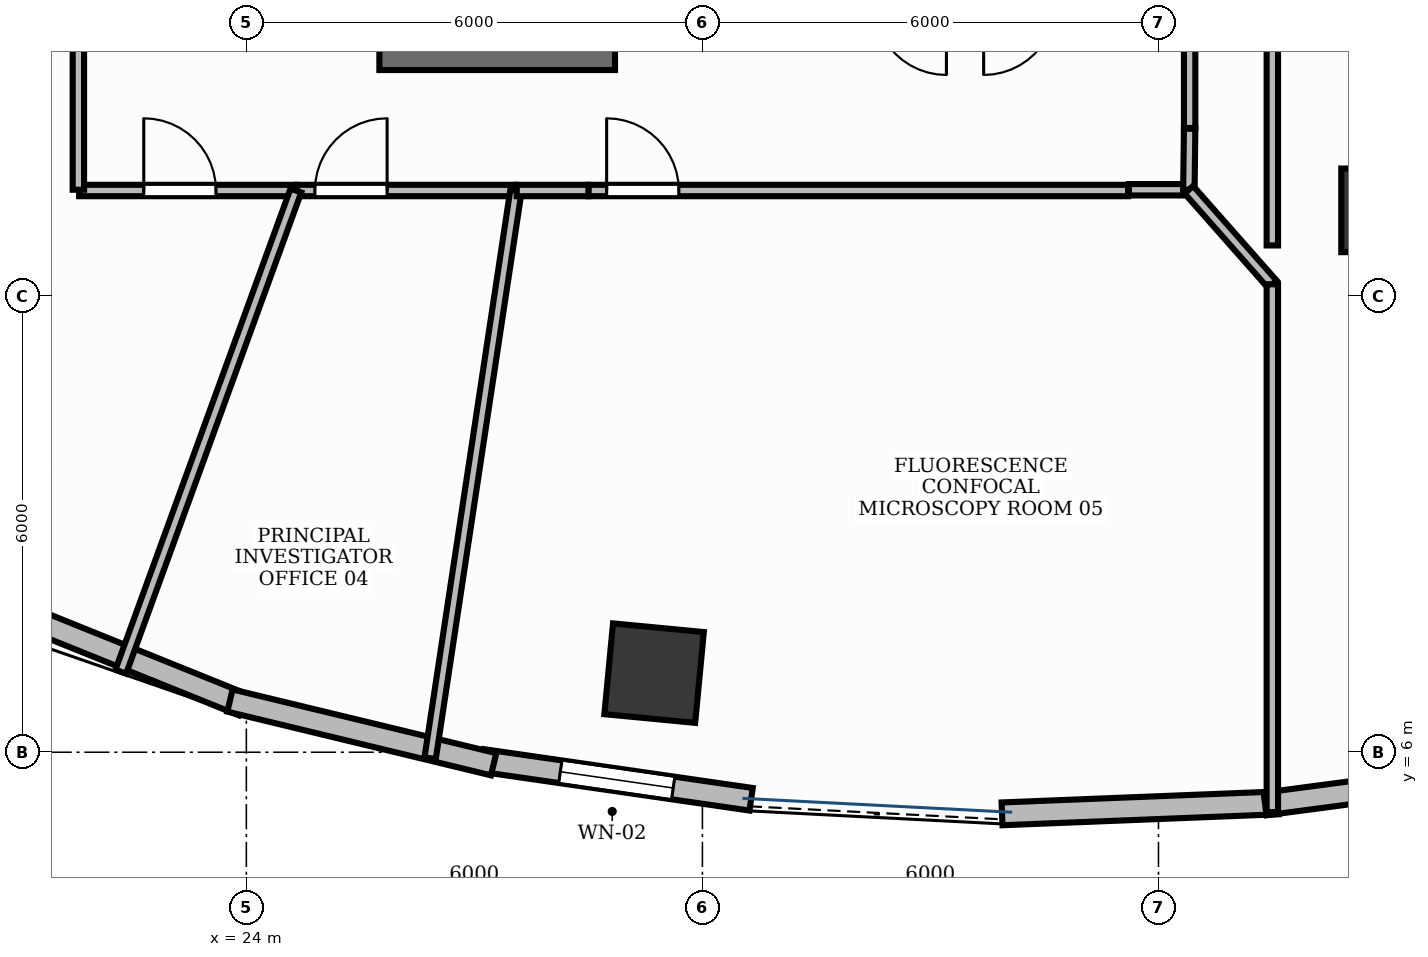
"""IFC4 building model, lengths in metres.
Left out: names, types, materials, properties, quantities, classifications, styles, units other than length and angle.
Written with IfcOpenShell. Run it as: python <this file> out.ifc"""

import sys

from ifc_helpers import new_model, si_unit, direction, frame, frame_2d, origin, origin_2d, place, context, subcontext, project, spatial, rectangle, extrude, element, fill, save


model = new_model("IFC4")
c1 = context("Model", 3, precision=1e-05, world=origin(), true_north=direction((0.0, 1.0)))
c2 = subcontext(c1, "Body", "Model", "MODEL_VIEW")
j1 = project(units=[si_unit("LENGTHUNIT", "METRE"), si_unit("PLANEANGLEUNIT", "RADIAN")], contexts=[c1])
p1 = place(None, origin())
s1 = spatial("IfcSite", under=j1, at=p1, CompositionType="ELEMENT")
p2 = place(p1, origin())
s2 = spatial("IfcBuilding", under=s1, at=p2, CompositionType="ELEMENT")
p3 = place(p2, frame((0.0, 0.0, 115.2)))
s3 = spatial("IfcBuildingStorey", under=s2, at=p3, CompositionType="ELEMENT", Elevation=115.2)
p4 = place(p3, frame((25.75, 15.2, 0.0), z_axis=(0.0, 0.0, 1.0), x_axis=(1.0, 0.0, 0.0)))
e1 = element("IfcWall", 1, at=p4, inside=s3, PredefinedType="SHEAR", context=c2, shape_type="SweptSolid", body=[
    extrude(rectangle(XDim=3.1, YDim=0.45, at=frame_2d((1.55, 0.0))), origin(), (0.0, 0.0, 1.0), 3.9),
])
p5 = place(p3, frame((29.364, 7.041, -0.0), z_axis=(0.0, 0.0, 1.0), x_axis=(-0.995462868748, 0.095150811579, 0.0)))
e2 = element("IfcColumn", 2, at=p5, inside=s3, PredefinedType="COLUMN", context=c2, shape_type="SweptSolid", body=[
    extrude(rectangle(XDim=1.2, YDim=1.2, at=origin_2d()), origin(), (0.0, 0.0, 1.0), 3.901),
])
p6 = place(p3, frame((38.955, 13.129, -0.0), z_axis=(0.0, 0.0, 1.0), x_axis=(1.0, 0.0, 0.0)))
e3 = element("IfcColumn", 3, at=p6, inside=s3, PredefinedType="COLUMN", context=c2, shape_type="SweptSolid", body=[
    extrude(rectangle(XDim=1.1, YDim=1.1, at=origin_2d()), origin(), (0.0, 0.0, 1.0), 3.901),
])
p7 = place(p3, frame((27.106, 5.892, 0.0), z_axis=(0.0, 0.0, 1.0), x_axis=(0.989740605239, -0.142875940389, 0.0)))
e4 = element("IfcWall", 4, at=p7, inside=s3, PredefinedType="STANDARD", context=c2, shape_type="SweptSolid", body=[
    extrude(rectangle(XDim=3.571, YDim=0.3, at=frame_2d((1.786, 0.0))), origin(), (0.0, 0.0, 1.0), 3.9),
])
p8 = place(p7, frame((1.036, 0.0, 0.95)))
e5 = element("IfcOpeningElement", 5, at=p8, cuts=e4, PredefinedType="OPENING", context=c2, shape_type="SweptSolid", body=[
    extrude(rectangle(XDim=1.5, YDim=1.8, at=frame_2d((0.75, 0.9))), frame((0.0, 0.165, 0.0), z_axis=(0.0, -1.0, 0.0), x_axis=(1.0, 0.0, 0.0)), (0.0, 0.0, 1.0), 0.33),
])
p9 = place(p3, frame((17.678, 9.157, 0.0), z_axis=(0.0, 0.0, 1.0), x_axis=(0.927423312416, -0.374013368194, 0.0)))
e6 = element("IfcWall", 6, at=p9, inside=s3, PredefinedType="STANDARD", context=c2, shape_type="SweptSolid", body=[
    extrude(rectangle(XDim=6.769, YDim=0.3, at=frame_2d((3.385, 0.0))), origin(), (0.0, 0.0, 1.0), 3.47),
])
p10 = place(p3, frame((23.784, 6.68, 0.0), z_axis=(0.0, 0.0, 1.0), x_axis=(0.972043452321, -0.234801036625, 0.0)))
e7 = element("IfcWall", 7, at=p10, inside=s3, PredefinedType="STANDARD", context=c2, shape_type="SweptSolid", body=[
    extrude(rectangle(XDim=3.569, YDim=0.3, at=frame_2d((1.784, 0.0))), origin(), (0.0, 0.0, 1.0), 3.9),
])
p11 = place(p3, frame((33.942, 5.189, 0.0), z_axis=(0.0, 0.0, 1.0), x_axis=(0.999212076676, 0.039689114679, 0.0)))
e8 = element("IfcWall", 8, at=p11, inside=s3, PredefinedType="STANDARD", context=c2, shape_type="SweptSolid", body=[
    extrude(rectangle(XDim=3.635, YDim=0.3, at=frame_2d((1.818, 0.0))), origin(), (0.0, 0.0, 1.0), 3.9),
])
p12 = place(p3, frame((37.402, 5.319, 0.0), z_axis=(0.0, 0.0, 1.0), x_axis=(0.991372969521, 0.131071107816, 0.0)))
e9 = element("IfcWall", 9, at=p12, inside=s3, PredefinedType="STANDARD", context=c2, shape_type="SweptSolid", body=[
    extrude(rectangle(XDim=3.615, YDim=0.3, at=frame_2d((1.808, 0.0))), origin(), (0.0, 0.0, 1.0), 3.9),
])
p13 = place(p3, frame((21.8, 13.39, 0.0), z_axis=(0.0, 0.0, 1.0), x_axis=(1.0, 0.0, 0.0)))
e10 = element("IfcWall", 10, at=p13, inside=s3, PredefinedType="PARTITIONING", context=c2, shape_type="SweptSolid", body=[
    extrude(rectangle(XDim=2.852, YDim=0.15, at=frame_2d((1.426, 0.0))), origin(), (0.0, 0.0, 1.0), 2.91),
])
p14 = place(p13, frame((0.85, 0.0, 0.0)))
e11 = element("IfcOpeningElement", 11, at=p14, cuts=e10, PredefinedType="OPENING", context=c2, shape_type="SweptSolid", body=[
    extrude(rectangle(XDim=0.95, YDim=2.15, at=frame_2d((0.475, 1.075))), frame((0.0, 0.09, 0.0), z_axis=(0.0, -1.0, 0.0), x_axis=(1.0, 0.0, 0.0)), (0.0, 0.0, 1.0), 0.18),
])
p15 = place(p3, frame((24.662, 13.39, 0.0), z_axis=(0.0, 0.0, 1.0), x_axis=(1.0, 0.0, 0.0)))
e12 = element("IfcWall", 12, at=p15, inside=s3, PredefinedType="PARTITIONING", context=c2, shape_type="SweptSolid", body=[
    extrude(rectangle(XDim=2.885, YDim=0.15, at=frame_2d((1.443, 0.0))), origin(), (0.0, 0.0, 1.0), 2.91),
])
p16 = place(p15, frame((0.24, 0.0, 0.0)))
e13 = element("IfcOpeningElement", 13, at=p16, cuts=e12, PredefinedType="OPENING", context=c2, shape_type="SweptSolid", body=[
    extrude(rectangle(XDim=0.95, YDim=2.15, at=frame_2d((0.475, 1.075))), frame((0.0, 0.09, 0.0), z_axis=(0.0, -1.0, 0.0), x_axis=(1.0, 0.0, 0.0)), (0.0, 0.0, 1.0), 0.18),
])
p17 = place(p3, frame((28.5, 13.39, 0.0), z_axis=(0.0, 0.0, 1.0), x_axis=(1.0, 0.0, 0.0)))
e14 = element("IfcWall", 14, at=p17, inside=s3, PredefinedType="PARTITIONING", context=c2, shape_type="SweptSolid", body=[
    extrude(rectangle(XDim=7.1, YDim=0.15, at=frame_2d((3.55, 0.0))), origin(), (0.0, 0.0, 1.0), 2.91),
])
p18 = place(p17, frame((0.24, 0.0, 0.0)))
e15 = element("IfcOpeningElement", 15, at=p18, cuts=e14, PredefinedType="OPENING", context=c2, shape_type="SweptSolid", body=[
    extrude(rectangle(XDim=0.95, YDim=2.15, at=frame_2d((0.475, 1.075))), frame((0.0, 0.09, 0.0), z_axis=(0.0, -1.0, 0.0), x_axis=(1.0, 0.0, 0.0)), (0.0, 0.0, 1.0), 0.18),
])
p19 = place(p3, frame((21.79, 18.44, 0.0), z_axis=(0.0, 0.0, 1.0), x_axis=(0.0, -1.0, 0.0)))
e16 = element("IfcWall", 16, at=p19, inside=s3, PredefinedType="PARTITIONING", context=c2, shape_type="SweptSolid", body=[
    extrude(rectangle(XDim=5.04, YDim=0.15, at=frame_2d((2.52, 0.0))), origin(), (0.0, 0.0, 1.0), 2.91),
])
p20 = place(p3, frame((24.652, 13.39, 0.0), z_axis=(0.0, 0.0, 1.0), x_axis=(-0.342007848086, -0.939697095796, 0.0)))
e17 = element("IfcWall", 17, at=p20, inside=s3, PredefinedType="PARTITIONING", context=c2, shape_type="SweptSolid", body=[
    extrude(rectangle(XDim=6.737, YDim=0.15, at=frame_2d((3.368, 0.0))), origin(), (0.0, 0.0, 1.0), 2.91),
])
p21 = place(p3, frame((27.547, 13.39, 0.0), z_axis=(0.0, 0.0, 1.0), x_axis=(-0.149552603586, -0.988753770542, 0.0)))
e18 = element("IfcWall", 18, at=p21, inside=s3, PredefinedType="PARTITIONING", context=c2, shape_type="SweptSolid", body=[
    extrude(rectangle(XDim=7.553, YDim=0.15, at=frame_2d((3.777, 0.0))), origin(), (0.0, 0.0, 1.0), 2.91),
])
p22 = place(p3, frame((27.557, 13.39, 0.0), z_axis=(0.0, 0.0, 1.0), x_axis=(1.0, 0.0, 0.0)))
e19 = element("IfcWall", 19, at=p22, inside=s3, PredefinedType="PARTITIONING", context=c2, shape_type="SweptSolid", body=[
    extrude(rectangle(XDim=0.943, YDim=0.15, at=frame_2d((0.471, 0.0))), origin(), (0.0, 0.0, 1.0), 2.91),
])
p23 = place(p3, frame((35.61, 13.4, 0.0), z_axis=(0.0, 0.0, 1.0), x_axis=(1.0, 0.0, 0.0)))
e20 = element("IfcWall", 20, at=p23, inside=s3, PredefinedType="PARTITIONING", context=c2, shape_type="SweptSolid", body=[
    extrude(rectangle(XDim=0.79, YDim=0.15, at=frame_2d((0.395, 0.0))), origin(), (0.0, 0.0, 1.0), 2.91),
])
p24 = place(p3, frame((36.4, 13.4, 0.0), z_axis=(0.0, 0.0, 1.0), x_axis=(0.012472409758, 0.999922216472, 0.0)))
e21 = element("IfcWall", 21, at=p24, inside=s3, PredefinedType="PARTITIONING", context=c2, shape_type="SweptSolid", body=[
    extrude(rectangle(XDim=0.802, YDim=0.15, at=frame_2d((0.401, 0.0))), origin(), (0.0, 0.0, 1.0), 2.91),
])
p25 = place(p3, frame((36.4, 13.4, 0.0), z_axis=(0.0, 0.0, 1.0), x_axis=(0.661894141329, -0.74959732235, 0.0)))
e22 = element("IfcWall", 22, at=p25, inside=s3, PredefinedType="PARTITIONING", context=c2, shape_type="SweptSolid", body=[
    extrude(rectangle(XDim=1.659, YDim=0.15, at=frame_2d((0.83, 0.0))), origin(), (0.0, 0.0, 1.0), 2.91),
])
p26 = place(p3, frame((37.498, 12.156, 0.0), z_axis=(0.0, 0.0, 1.0), x_axis=(0.0, -1.0, 0.0)))
e23 = element("IfcWall", 23, at=p26, inside=s3, PredefinedType="PARTITIONING", context=c2, shape_type="SweptSolid", body=[
    extrude(rectangle(XDim=6.943, YDim=0.15, at=frame_2d((3.472, 0.0))), origin(), (0.0, 0.0, 1.0), 2.91),
])
p27 = place(p3, frame((37.498, 17.391, 0.0), z_axis=(0.0, 0.0, 1.0), x_axis=(0.0, -1.0, 0.0)))
e24 = element("IfcWall", 24, at=p27, inside=s3, PredefinedType="PARTITIONING", context=c2, shape_type="SweptSolid", body=[
    extrude(rectangle(XDim=4.723, YDim=0.15, at=frame_2d((2.362, 0.0))), origin(), (0.0, 0.0, 1.0), 2.91),
])
p28 = place(p3, frame((36.41, 14.212, 0.0), z_axis=(0.0, 0.0, 1.0), x_axis=(0.0, 1.0, 0.0)))
e25 = element("IfcWall", 25, at=p28, inside=s3, PredefinedType="PARTITIONING", context=c2, shape_type="SweptSolid", body=[
    extrude(rectangle(XDim=1.638, YDim=0.15, at=frame_2d((0.819, 0.0))), origin(), (0.0, 0.0, 1.0), 2.91),
])
p29 = place(p8, origin())
e26 = element("IfcWindow", 26, at=p29, inside=s3, PartitioningType="DOUBLE_PANEL_VERTICAL", PredefinedType="WINDOW", context=c2, shape_type="SweptSolid", body=[
    extrude(rectangle(XDim=1.5, YDim=1.8, at=frame_2d((0.75, 0.9))), frame((0.0, 0.03, 0.0), z_axis=(0.0, -1.0, 0.0), x_axis=(1.0, 0.0, 0.0)), (0.0, 0.0, 1.0), 0.06),
])
fill(e5, e26)
p30 = place(p14, origin())
e27 = element("IfcDoor", 27, at=p30, inside=s3, OperationType="SINGLE_SWING_LEFT", PredefinedType="DOOR", context=c2, shape_type="SweptSolid", body=[
    extrude(rectangle(XDim=0.95, YDim=2.15, at=frame_2d((0.475, 1.075))), frame((0.0, 0.025, 0.0), z_axis=(0.0, -1.0, 0.0), x_axis=(1.0, 0.0, 0.0)), (0.0, 0.0, 1.0), 0.05),
])
fill(e11, e27)
p31 = place(p16, origin())
e28 = element("IfcDoor", 28, at=p31, inside=s3, OperationType="SINGLE_SWING_RIGHT", PredefinedType="DOOR", context=c2, shape_type="SweptSolid", body=[
    extrude(rectangle(XDim=0.95, YDim=2.15, at=frame_2d((0.475, 1.075))), frame((0.0, 0.025, 0.0), z_axis=(0.0, -1.0, 0.0), x_axis=(1.0, 0.0, 0.0)), (0.0, 0.0, 1.0), 0.05),
])
fill(e13, e28)
p32 = place(p18, origin())
e29 = element("IfcDoor", 29, at=p32, inside=s3, OperationType="SINGLE_SWING_LEFT", PredefinedType="DOOR", context=c2, shape_type="SweptSolid", body=[
    extrude(rectangle(XDim=0.95, YDim=2.15, at=frame_2d((0.475, 1.075))), frame((0.0, 0.025, 0.0), z_axis=(0.0, -1.0, 0.0), x_axis=(1.0, 0.0, 0.0)), (0.0, 0.0, 1.0), 0.05),
])
fill(e15, e29)
save(model, sys.argv[1])
